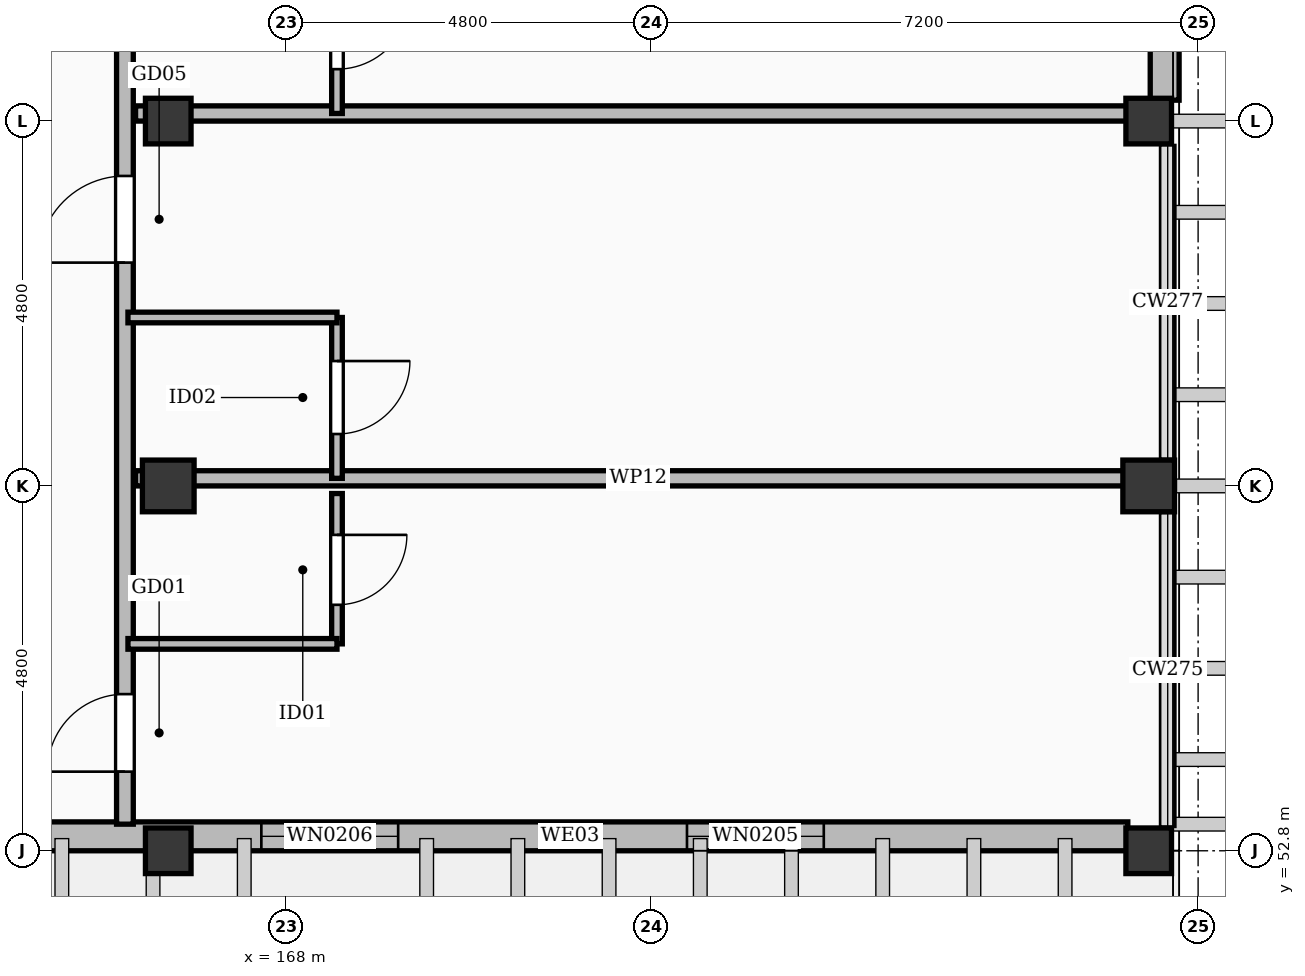
"""IFC4 building model, lengths in metres.
Left out: names, types, materials, properties, quantities, classifications, styles, units other than length and angle.
Written with IfcOpenShell. Run it as: python <this file> out.ifc"""

import sys

from ifc_helpers import new_model, si_unit, direction, frame, frame_2d, origin, origin_2d, place, context, subcontext, project, spatial, rectangle, extrude, element, fill, save


model = new_model("IFC4")
c1 = context("Model", 3, precision=1e-05, world=origin(), true_north=direction((0.0, 1.0)))
c2 = subcontext(c1, "Body", "Model", "MODEL_VIEW")
j1 = project(units=[si_unit("LENGTHUNIT", "METRE"), si_unit("PLANEANGLEUNIT", "RADIAN")], contexts=[c1])
p1 = place(None, origin())
s1 = spatial("IfcSite", under=j1, at=p1, CompositionType="ELEMENT")
p2 = place(p1, origin())
s2 = spatial("IfcBuilding", under=s1, at=p2, CompositionType="ELEMENT")
p3 = place(p2, frame((0.0, 0.0, 35.4)))
s3 = spatial("IfcBuildingStorey", under=s2, at=p3, CompositionType="ELEMENT", Elevation=35.4)
for number, where, z_axis, x_axis in (
    (1, (166.45, 57.6, 0.0), (0.0, 0.0, 1.0), (1.0, 0.0, 0.0)),
    (2, (179.35, 57.6, 0.0), (0.0, 0.0, 1.0), (1.0, 0.0, 0.0)),
):
    element("IfcColumn", number, at=place(p3, frame(where, z_axis=z_axis, x_axis=x_axis)), inside=s3, PredefinedType="COLUMN", context=c2, shape_type="SweptSolid", body=[
        extrude(rectangle(XDim=0.68, YDim=0.68, at=origin_2d()), origin(), (0.0, 0.0, 1.0), 3.6),
    ])
for number, where, z_axis, x_axis in (
    (3, (166.45, 52.8, 0.0), (0.0, 0.0, 1.0), (1.0, 0.0, 0.0)),
    (4, (166.45, 62.4, 0.0), (0.0, 0.0, 1.0), (1.0, 0.0, 0.0)),
    (5, (179.35, 52.8, 0.0), (0.0, 0.0, 1.0), (1.0, 0.0, 0.0)),
    (6, (179.35, 62.4, 0.0), (0.0, 0.0, 1.0), (1.0, 0.0, 0.0)),
):
    element("IfcColumn", number, at=place(p3, frame(where, z_axis=z_axis, x_axis=x_axis)), inside=s3, PredefinedType="COLUMN", context=c2, shape_type="SweptSolid", body=[
        extrude(rectangle(XDim=0.6, YDim=0.6, at=origin_2d()), origin(), (0.0, 0.0, 1.0), 3.6),
    ])
p4 = place(p3, frame((179.075, 52.99, 0.0), z_axis=(0.0, 0.0, 1.0), x_axis=(-1.0, 0.0, 0.0)))
e7 = element("IfcWall", 7, at=p4, inside=s3, PredefinedType="SOLIDWALL", context=c2, shape_type="SweptSolid", body=[
    extrude(rectangle(XDim=29.35, YDim=0.38, at=frame_2d((14.675, 0.0))), origin(), (0.0, 0.0, 1.0), 2.602),
])
p5 = place(p4, frame((14.5, 0.0, 0.0)))
e8 = element("IfcOpeningElement", 8, at=p5, cuts=e7, PredefinedType="OPENING", context=c2, shape_type="SweptSolid", body=[
    extrude(rectangle(XDim=1.6, YDim=2.25, at=frame_2d((0.8, 1.125))), frame((0.0, 0.202, 0.0), z_axis=(0.0, -1.0, 0.0), x_axis=(1.0, 0.0, 0.0)), (0.0, 0.0, 1.0), 0.404),
])
p6 = place(p4, frame((4.0, 0.0, 0.55)))
e9 = element("IfcOpeningElement", 9, at=p6, cuts=e7, PredefinedType="OPENING", context=c2, shape_type="SweptSolid", body=[
    extrude(rectangle(XDim=1.8, YDim=1.76, at=frame_2d((0.9, 0.88))), frame((0.0, 0.202, 0.0), z_axis=(0.0, -1.0, 0.0), x_axis=(1.0, 0.0, 0.0)), (0.0, 0.0, 1.0), 0.404),
])
p7 = place(p4, frame((9.6, 0.0, 0.55)))
e10 = element("IfcOpeningElement", 10, at=p7, cuts=e7, PredefinedType="OPENING", context=c2, shape_type="SweptSolid", body=[
    extrude(rectangle(XDim=1.8, YDim=1.76, at=frame_2d((0.9, 0.88))), frame((0.0, 0.202, 0.0), z_axis=(0.0, -1.0, 0.0), x_axis=(1.0, 0.0, 0.0)), (0.0, 0.0, 1.0), 0.404),
])
p8 = place(p4, frame((20.8, 0.0, 0.55)))
e11 = element("IfcOpeningElement", 11, at=p8, cuts=e7, PredefinedType="OPENING", context=c2, shape_type="SweptSolid", body=[
    extrude(rectangle(XDim=1.8, YDim=1.76, at=frame_2d((0.9, 0.88))), frame((0.0, 0.202, 0.0), z_axis=(0.0, -1.0, 0.0), x_axis=(1.0, 0.0, 0.0)), (0.0, 0.0, 1.0), 0.404),
])
p9 = place(p4, frame((25.4, 0.0, 0.55)))
e12 = element("IfcOpeningElement", 12, at=p9, cuts=e7, PredefinedType="OPENING", context=c2, shape_type="SweptSolid", body=[
    extrude(rectangle(XDim=1.8, YDim=1.76, at=frame_2d((0.9, 0.88))), frame((0.0, 0.202, 0.0), z_axis=(0.0, -1.0, 0.0), x_axis=(1.0, 0.0, 0.0)), (0.0, 0.0, 1.0), 0.404),
])
p10 = place(p3, frame((179.56, 66.885, 0.0), z_axis=(0.0, 0.0, 1.0), x_axis=(0.0, -1.0, 0.0)))
e13 = element("IfcWall", 13, at=p10, inside=s3, PredefinedType="SOLIDWALL", context=c2, shape_type="SweptSolid", body=[
    extrude(rectangle(XDim=4.21, YDim=0.38, at=frame_2d((2.105, 0.0))), origin(), (0.0, 0.0, 1.0), 2.602),
])
p11 = place(p10, frame((1.58, 0.0, 0.55)))
e14 = element("IfcOpeningElement", 14, at=p11, cuts=e13, PredefinedType="OPENING", context=c2, shape_type="SweptSolid", body=[
    extrude(rectangle(XDim=1.05, YDim=1.65, at=frame_2d((0.525, 0.825))), frame((0.0, 0.202, 0.0), z_axis=(0.0, -1.0, 0.0), x_axis=(1.0, 0.0, 0.0)), (0.0, 0.0, 1.0), 0.404),
])
p12 = place(p3, frame((165.88, 53.15, 0.0), z_axis=(0.0, 0.0, 1.0), x_axis=(0.0, 1.0, 0.0)))
e15 = element("IfcWall", 15, at=p12, inside=s3, PredefinedType="PARTITIONING", context=c2, shape_type="SweptSolid", body=[
    extrude(rectangle(XDim=72.5, YDim=0.22, at=frame_2d((36.25, 0.0))), origin(), (0.0, 0.0, 1.0), 2.602),
])
p13 = place(p12, frame((0.691, 0.0, 0.0)))
e16 = element("IfcOpeningElement", 16, at=p13, cuts=e15, PredefinedType="OPENING", context=c2, shape_type="SweptSolid", body=[
    extrude(rectangle(XDim=1.02, YDim=2.2, at=frame_2d((0.51, 1.1))), frame((0.0, 0.122, 0.0), z_axis=(0.0, -1.0, 0.0), x_axis=(1.0, 0.0, 0.0)), (0.0, 0.0, 1.0), 0.244),
])
p14 = place(p12, frame((7.388, 0.0, 0.0)))
e17 = element("IfcOpeningElement", 17, at=p14, cuts=e15, PredefinedType="OPENING", context=c2, shape_type="SweptSolid", body=[
    extrude(rectangle(XDim=1.14, YDim=2.26, at=frame_2d((0.57, 1.13))), frame((0.0, 0.122, 0.0), z_axis=(0.0, -1.0, 0.0), x_axis=(1.0, 0.0, 0.0)), (0.0, 0.0, 1.0), 0.244),
])
p15 = place(p12, frame((12.188, 0.0, 0.0)))
e18 = element("IfcOpeningElement", 18, at=p15, cuts=e15, PredefinedType="OPENING", context=c2, shape_type="SweptSolid", body=[
    extrude(rectangle(XDim=0.98, YDim=2.15, at=frame_2d((0.49, 1.075))), frame((0.0, 0.122, 0.0), z_axis=(0.0, -1.0, 0.0), x_axis=(1.0, 0.0, 0.0)), (0.0, 0.0, 1.0), 0.244),
])
p16 = place(p12, frame((16.988, 0.0, 0.0)))
e19 = element("IfcOpeningElement", 19, at=p16, cuts=e15, PredefinedType="OPENING", context=c2, shape_type="SweptSolid", body=[
    extrude(rectangle(XDim=1.28, YDim=2.16, at=frame_2d((0.64, 1.08))), frame((0.0, 0.122, 0.0), z_axis=(0.0, -1.0, 0.0), x_axis=(1.0, 0.0, 0.0)), (0.0, 0.0, 1.0), 0.244),
])
p17 = place(p12, frame((21.788, 0.0, 0.0)))
e20 = element("IfcOpeningElement", 20, at=p17, cuts=e15, PredefinedType="OPENING", context=c2, shape_type="SweptSolid", body=[
    extrude(rectangle(XDim=0.9, YDim=2.08, at=frame_2d((0.45, 1.04))), frame((0.0, 0.122, 0.0), z_axis=(0.0, -1.0, 0.0), x_axis=(1.0, 0.0, 0.0)), (0.0, 0.0, 1.0), 0.244),
])
p18 = place(p12, frame((26.588, 0.0, 0.0)))
e21 = element("IfcOpeningElement", 21, at=p18, cuts=e15, PredefinedType="OPENING", context=c2, shape_type="SweptSolid", body=[
    extrude(rectangle(XDim=1.05, YDim=2.22, at=frame_2d((0.525, 1.11))), frame((0.0, 0.122, 0.0), z_axis=(0.0, -1.0, 0.0), x_axis=(1.0, 0.0, 0.0)), (0.0, 0.0, 1.0), 0.244),
])
p19 = place(p12, frame((31.388, 0.0, 0.0)))
e22 = element("IfcOpeningElement", 22, at=p19, cuts=e15, PredefinedType="OPENING", context=c2, shape_type="SweptSolid", body=[
    extrude(rectangle(XDim=1.02, YDim=2.2, at=frame_2d((0.51, 1.1))), frame((0.0, 0.122, 0.0), z_axis=(0.0, -1.0, 0.0), x_axis=(1.0, 0.0, 0.0)), (0.0, 0.0, 1.0), 0.244),
])
p20 = place(p12, frame((36.188, 0.0, 0.0)))
e23 = element("IfcOpeningElement", 23, at=p20, cuts=e15, PredefinedType="OPENING", context=c2, shape_type="SweptSolid", body=[
    extrude(rectangle(XDim=1.14, YDim=2.26, at=frame_2d((0.57, 1.13))), frame((0.0, 0.122, 0.0), z_axis=(0.0, -1.0, 0.0), x_axis=(1.0, 0.0, 0.0)), (0.0, 0.0, 1.0), 0.244),
])
p21 = place(p12, frame((40.988, 0.0, 0.0)))
e24 = element("IfcOpeningElement", 24, at=p21, cuts=e15, PredefinedType="OPENING", context=c2, shape_type="SweptSolid", body=[
    extrude(rectangle(XDim=0.98, YDim=2.15, at=frame_2d((0.49, 1.075))), frame((0.0, 0.122, 0.0), z_axis=(0.0, -1.0, 0.0), x_axis=(1.0, 0.0, 0.0)), (0.0, 0.0, 1.0), 0.244),
])
p22 = place(p12, frame((45.788, 0.0, 0.0)))
e25 = element("IfcOpeningElement", 25, at=p22, cuts=e15, PredefinedType="OPENING", context=c2, shape_type="SweptSolid", body=[
    extrude(rectangle(XDim=1.28, YDim=2.16, at=frame_2d((0.64, 1.08))), frame((0.0, 0.122, 0.0), z_axis=(0.0, -1.0, 0.0), x_axis=(1.0, 0.0, 0.0)), (0.0, 0.0, 1.0), 0.244),
])
p23 = place(p12, frame((50.588, 0.0, 0.0)))
e26 = element("IfcOpeningElement", 26, at=p23, cuts=e15, PredefinedType="OPENING", context=c2, shape_type="SweptSolid", body=[
    extrude(rectangle(XDim=0.9, YDim=2.08, at=frame_2d((0.45, 1.04))), frame((0.0, 0.122, 0.0), z_axis=(0.0, -1.0, 0.0), x_axis=(1.0, 0.0, 0.0)), (0.0, 0.0, 1.0), 0.244),
])
p24 = place(p12, frame((55.388, 0.0, 0.0)))
e27 = element("IfcOpeningElement", 27, at=p24, cuts=e15, PredefinedType="OPENING", context=c2, shape_type="SweptSolid", body=[
    extrude(rectangle(XDim=1.05, YDim=2.22, at=frame_2d((0.525, 1.11))), frame((0.0, 0.122, 0.0), z_axis=(0.0, -1.0, 0.0), x_axis=(1.0, 0.0, 0.0)), (0.0, 0.0, 1.0), 0.244),
])
p25 = place(p12, frame((60.188, 0.0, 0.0)))
e28 = element("IfcOpeningElement", 28, at=p25, cuts=e15, PredefinedType="OPENING", context=c2, shape_type="SweptSolid", body=[
    extrude(rectangle(XDim=1.02, YDim=2.2, at=frame_2d((0.51, 1.1))), frame((0.0, 0.122, 0.0), z_axis=(0.0, -1.0, 0.0), x_axis=(1.0, 0.0, 0.0)), (0.0, 0.0, 1.0), 0.244),
])
p26 = place(p12, frame((64.988, 0.0, 0.0)))
e29 = element("IfcOpeningElement", 29, at=p26, cuts=e15, PredefinedType="OPENING", context=c2, shape_type="SweptSolid", body=[
    extrude(rectangle(XDim=1.14, YDim=2.26, at=frame_2d((0.57, 1.13))), frame((0.0, 0.122, 0.0), z_axis=(0.0, -1.0, 0.0), x_axis=(1.0, 0.0, 0.0)), (0.0, 0.0, 1.0), 0.244),
])
p27 = place(p12, frame((69.788, 0.0, 0.0)))
e30 = element("IfcOpeningElement", 30, at=p27, cuts=e15, PredefinedType="OPENING", context=c2, shape_type="SweptSolid", body=[
    extrude(rectangle(XDim=0.98, YDim=2.15, at=frame_2d((0.49, 1.075))), frame((0.0, 0.122, 0.0), z_axis=(0.0, -1.0, 0.0), x_axis=(1.0, 0.0, 0.0)), (0.0, 0.0, 1.0), 0.244),
])
p28 = place(p3, frame((168.67, 55.522, 0.0), z_axis=(0.0, 0.0, 1.0), x_axis=(0.0, 1.0, 0.0)))
e31 = element("IfcWall", 31, at=p28, inside=s3, PredefinedType="PARTITIONING", context=c2, shape_type="SweptSolid", body=[
    extrude(rectangle(XDim=1.978, YDim=0.14, at=frame_2d((0.989, 0.0))), origin(), (0.0, 0.0, 1.0), 2.732),
])
p29 = place(p28, frame((0.514, 0.0, 0.0)))
e32 = element("IfcOpeningElement", 32, at=p29, cuts=e31, PredefinedType="OPENING", context=c2, shape_type="SweptSolid", body=[
    extrude(rectangle(XDim=0.92, YDim=2.1, at=frame_2d((0.46, 1.05))), frame((0.0, 0.082, 0.0), z_axis=(0.0, -1.0, 0.0), x_axis=(1.0, 0.0, 0.0)), (0.0, 0.0, 1.0), 0.164),
])
p30 = place(p3, frame((165.92, 55.522, 0.0), z_axis=(0.0, 0.0, 1.0), x_axis=(1.0, 0.0, 0.0)))
e33 = element("IfcWall", 33, at=p30, inside=s3, PredefinedType="PARTITIONING", context=c2, shape_type="SweptSolid", body=[
    extrude(rectangle(XDim=2.75, YDim=0.14, at=frame_2d((1.375, 0.0))), origin(), (0.0, 0.0, 1.0), 2.732),
])
p31 = place(p3, frame((166.02, 57.7, 0.0), z_axis=(0.0, 0.0, 1.0), x_axis=(1.0, 0.0, 0.0)))
e34 = element("IfcWall", 34, at=p31, inside=s3, PredefinedType="PARTITIONING", context=c2, shape_type="SweptSolid", body=[
    extrude(rectangle(XDim=13.23, YDim=0.2, at=frame_2d((6.615, 0.0))), origin(), (0.0, 0.0, 1.0), 2.602),
])
p32 = place(p3, frame((168.67, 57.7, 0.0), z_axis=(0.0, 0.0, 1.0), x_axis=(0.0, 1.0, 0.0)))
e35 = element("IfcWall", 35, at=p32, inside=s3, PredefinedType="PARTITIONING", context=c2, shape_type="SweptSolid", body=[
    extrude(rectangle(XDim=2.116, YDim=0.14, at=frame_2d((1.058, 0.0))), origin(), (0.0, 0.0, 1.0), 2.732),
])
p33 = place(p32, frame((0.583, 0.0, 0.0)))
e36 = element("IfcOpeningElement", 36, at=p33, cuts=e35, PredefinedType="OPENING", context=c2, shape_type="SweptSolid", body=[
    extrude(rectangle(XDim=0.96, YDim=2.12, at=frame_2d((0.48, 1.06))), frame((0.0, 0.082, 0.0), z_axis=(0.0, -1.0, 0.0), x_axis=(1.0, 0.0, 0.0)), (0.0, 0.0, 1.0), 0.164),
])
p34 = place(p3, frame((165.92, 59.816, 0.0), z_axis=(0.0, 0.0, 1.0), x_axis=(1.0, 0.0, 0.0)))
e37 = element("IfcWall", 37, at=p34, inside=s3, PredefinedType="PARTITIONING", context=c2, shape_type="SweptSolid", body=[
    extrude(rectangle(XDim=2.75, YDim=0.14, at=frame_2d((1.375, 0.0))), origin(), (0.0, 0.0, 1.0), 2.732),
])
p35 = place(p3, frame((166.02, 62.5, 0.0), z_axis=(0.0, 0.0, 1.0), x_axis=(1.0, 0.0, 0.0)))
e38 = element("IfcWall", 38, at=p35, inside=s3, PredefinedType="PARTITIONING", context=c2, shape_type="SweptSolid", body=[
    extrude(rectangle(XDim=13.23, YDim=0.2, at=frame_2d((6.615, 0.0))), origin(), (0.0, 0.0, 1.0), 2.602),
])
p36 = place(p3, frame((168.67, 62.5, 0.0), z_axis=(0.0, 0.0, 1.0), x_axis=(0.0, 1.0, 0.0)))
e39 = element("IfcWall", 39, at=p36, inside=s3, PredefinedType="PARTITIONING", context=c2, shape_type="SweptSolid", body=[
    extrude(rectangle(XDim=2.116, YDim=0.14, at=frame_2d((1.058, 0.0))), origin(), (0.0, 0.0, 1.0), 2.732),
])
p37 = place(p36, frame((0.583, 0.0, 0.0)))
e40 = element("IfcOpeningElement", 40, at=p37, cuts=e39, PredefinedType="OPENING", context=c2, shape_type="SweptSolid", body=[
    extrude(rectangle(XDim=0.96, YDim=2.12, at=frame_2d((0.48, 1.06))), frame((0.0, 0.082, 0.0), z_axis=(0.0, -1.0, 0.0), x_axis=(1.0, 0.0, 0.0)), (0.0, 0.0, 1.0), 0.164),
])
p38 = place(p6, origin())
e41 = element("IfcWindow", 41, at=p38, inside=s3, PartitioningType="SINGLE_PANEL", PredefinedType="WINDOW", context=c2, shape_type="SweptSolid", body=[
    extrude(rectangle(XDim=1.8, YDim=1.76, at=frame_2d((0.9, 0.88))), frame((0.0, 0.03, 0.0), z_axis=(0.0, -1.0, 0.0), x_axis=(1.0, 0.0, 0.0)), (0.0, 0.0, 1.0), 0.06),
])
fill(e9, e41)
p39 = place(p7, origin())
e42 = element("IfcWindow", 42, at=p39, inside=s3, PartitioningType="SINGLE_PANEL", PredefinedType="WINDOW", context=c2, shape_type="SweptSolid", body=[
    extrude(rectangle(XDim=1.8, YDim=1.76, at=frame_2d((0.9, 0.88))), frame((0.0, 0.03, 0.0), z_axis=(0.0, -1.0, 0.0), x_axis=(1.0, 0.0, 0.0)), (0.0, 0.0, 1.0), 0.06),
])
fill(e10, e42)
p40 = place(p13, origin())
e43 = element("IfcDoor", 43, at=p40, inside=s3, OperationType="SINGLE_SWING_LEFT", PredefinedType="DOOR", context=c2, shape_type="SweptSolid", body=[
    extrude(rectangle(XDim=1.02, YDim=2.2, at=frame_2d((0.51, 1.1))), frame((0.0, 0.025, 0.0), z_axis=(0.0, -1.0, 0.0), x_axis=(1.0, 0.0, 0.0)), (0.0, 0.0, 1.0), 0.05),
])
fill(e16, e43)
p41 = place(p29, frame((0.92, 0.0, 0.0), z_axis=(0.0, 0.0, 1.0), x_axis=(-1.0, 0.0, 0.0)))
e44 = element("IfcDoor", 44, at=p41, inside=s3, OperationType="SINGLE_SWING_RIGHT", PredefinedType="DOOR", context=c2, shape_type="SweptSolid", body=[
    extrude(rectangle(XDim=0.92, YDim=2.1, at=frame_2d((0.46, 1.05))), frame((0.0, 0.025, 0.0), z_axis=(0.0, -1.0, 0.0), x_axis=(1.0, 0.0, 0.0)), (0.0, 0.0, 1.0), 0.05),
])
fill(e32, e44)
p42 = place(p14, origin())
e45 = element("IfcDoor", 45, at=p42, inside=s3, OperationType="SINGLE_SWING_LEFT", PredefinedType="DOOR", context=c2, shape_type="SweptSolid", body=[
    extrude(rectangle(XDim=1.14, YDim=2.26, at=frame_2d((0.57, 1.13))), frame((0.0, 0.025, 0.0), z_axis=(0.0, -1.0, 0.0), x_axis=(1.0, 0.0, 0.0)), (0.0, 0.0, 1.0), 0.05),
])
fill(e17, e45)
p43 = place(p33, frame((0.96, 0.0, 0.0), z_axis=(0.0, 0.0, 1.0), x_axis=(-1.0, 0.0, 0.0)))
e46 = element("IfcDoor", 46, at=p43, inside=s3, OperationType="SINGLE_SWING_RIGHT", PredefinedType="DOOR", context=c2, shape_type="SweptSolid", body=[
    extrude(rectangle(XDim=0.96, YDim=2.12, at=frame_2d((0.48, 1.06))), frame((0.0, 0.025, 0.0), z_axis=(0.0, -1.0, 0.0), x_axis=(1.0, 0.0, 0.0)), (0.0, 0.0, 1.0), 0.05),
])
fill(e36, e46)
p44 = place(p37, frame((0.96, 0.0, 0.0), z_axis=(0.0, 0.0, 1.0), x_axis=(-1.0, 0.0, 0.0)))
e47 = element("IfcDoor", 47, at=p44, inside=s3, OperationType="SINGLE_SWING_RIGHT", PredefinedType="DOOR", context=c2, shape_type="SweptSolid", body=[
    extrude(rectangle(XDim=0.96, YDim=2.12, at=frame_2d((0.48, 1.06))), frame((0.0, 0.025, 0.0), z_axis=(0.0, -1.0, 0.0), x_axis=(1.0, 0.0, 0.0)), (0.0, 0.0, 1.0), 0.05),
])
fill(e40, e47)
save(model, sys.argv[1])
